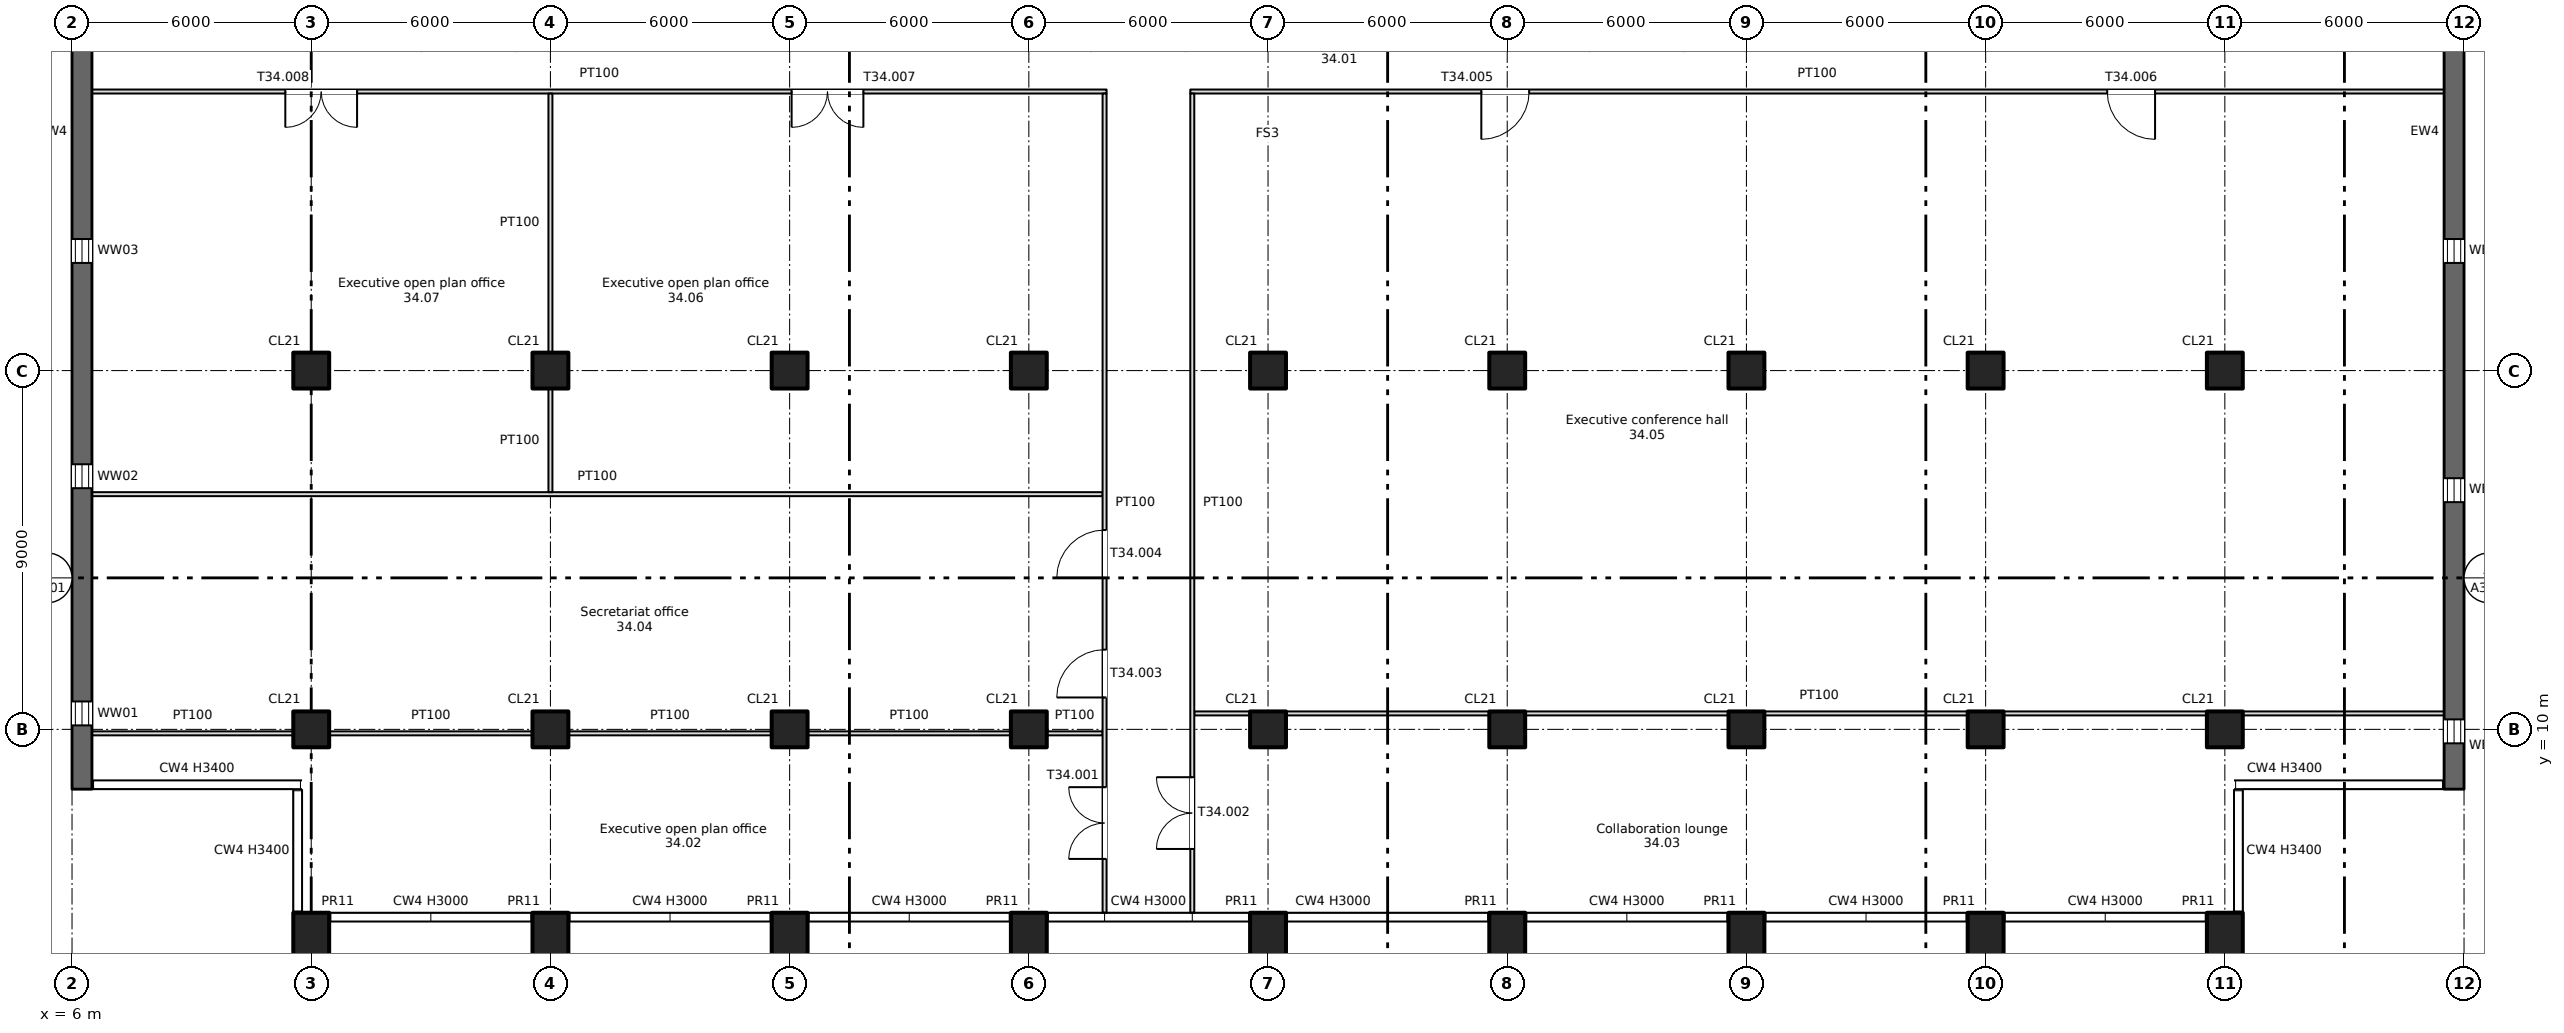
"""IFC4 building model, lengths in metres.
Left out: names, types, materials, properties, quantities, classifications, styles, units other than length and angle.
Written with IfcOpenShell. Run it as: python <this file> out.ifc"""

import sys

from ifc_helpers import new_model, si_unit, direction, frame, frame_2d, origin, origin_2d, place, context, subcontext, project, spatial, rectangle, extrude, element, fill, save


model = new_model("IFC4")
c1 = context("Model", 3, precision=1e-05, world=origin(), true_north=direction((0.0, 1.0)))
c2 = subcontext(c1, "Body", "Model", "MODEL_VIEW")
j1 = project(units=[si_unit("LENGTHUNIT", "METRE"), si_unit("PLANEANGLEUNIT", "RADIAN")], contexts=[c1])
p1 = place(None, origin())
s1 = spatial("IfcSite", under=j1, at=p1, CompositionType="ELEMENT")
p2 = place(p1, origin())
s2 = spatial("IfcBuilding", under=s1, at=p2, CompositionType="ELEMENT")
p3 = place(p2, frame((0.0, 0.0, 239.35)))
s3 = spatial("IfcBuildingStorey", under=s2, at=p3, CompositionType="ELEMENT", Elevation=239.35)
for number, where, z_axis, x_axis in (
    (1, (12.0, 4.7, -0.4), (0.0, 0.0, 1.0), (1.0, 0.0, 0.0)),
    (2, (18.0, 4.7, -0.4), (0.0, 0.0, 1.0), (1.0, 0.0, 0.0)),
    (3, (24.0, 4.7, -0.4), (0.0, 0.0, 1.0), (1.0, 0.0, 0.0)),
    (4, (30.0, 4.7, -0.4), (0.0, 0.0, 1.0), (1.0, 0.0, 0.0)),
    (5, (36.0, 4.7, -0.4), (0.0, 0.0, 1.0), (1.0, 0.0, 0.0)),
    (6, (42.0, 4.7, -0.4), (0.0, 0.0, 1.0), (1.0, 0.0, 0.0)),
    (7, (48.0, 4.7, -0.4), (0.0, 0.0, 1.0), (1.0, 0.0, 0.0)),
    (8, (54.0, 4.7, -0.4), (0.0, 0.0, 1.0), (1.0, 0.0, 0.0)),
    (9, (60.0, 4.7, -0.4), (0.0, 0.0, 1.0), (1.0, 0.0, 0.0)),
):
    element("IfcColumn", number, at=place(p3, frame(where, z_axis=z_axis, x_axis=x_axis)), inside=s3, PredefinedType="COLUMN", context=c2, shape_type="SweptSolid", body=[
        extrude(rectangle(XDim=0.9, YDim=1.4, at=origin_2d()), origin(), (0.0, 0.0, 1.0), 3.8),
    ])
for number, where, z_axis, x_axis in (
    (10, (12.0, 10.0, 0.0), (0.0, 0.0, 1.0), (1.0, 0.0, 0.0)),
    (11, (12.0, 19.0, 0.0), (0.0, 0.0, 1.0), (1.0, 0.0, 0.0)),
    (12, (18.0, 10.0, 0.0), (0.0, 0.0, 1.0), (1.0, 0.0, 0.0)),
    (13, (18.0, 19.0, 0.0), (0.0, 0.0, 1.0), (1.0, 0.0, 0.0)),
    (14, (24.0, 10.0, 0.0), (0.0, 0.0, 1.0), (1.0, 0.0, 0.0)),
    (15, (24.0, 19.0, 0.0), (0.0, 0.0, 1.0), (1.0, 0.0, 0.0)),
    (16, (30.0, 10.0, 0.0), (0.0, 0.0, 1.0), (1.0, 0.0, 0.0)),
    (17, (30.0, 19.0, 0.0), (0.0, 0.0, 1.0), (1.0, 0.0, 0.0)),
    (18, (36.0, 10.0, 0.0), (0.0, 0.0, 1.0), (1.0, 0.0, 0.0)),
    (19, (36.0, 19.0, 0.0), (0.0, 0.0, 1.0), (1.0, 0.0, 0.0)),
    (20, (42.0, 10.0, 0.0), (0.0, 0.0, 1.0), (1.0, 0.0, 0.0)),
    (21, (42.0, 19.0, 0.0), (0.0, 0.0, 1.0), (1.0, 0.0, 0.0)),
    (22, (48.0, 10.0, 0.0), (0.0, 0.0, 1.0), (1.0, 0.0, 0.0)),
    (23, (48.0, 19.0, 0.0), (0.0, 0.0, 1.0), (1.0, 0.0, 0.0)),
    (24, (54.0, 10.0, 0.0), (0.0, 0.0, 1.0), (1.0, 0.0, 0.0)),
    (25, (54.0, 19.0, 0.0), (0.0, 0.0, 1.0), (1.0, 0.0, 0.0)),
    (26, (60.0, 10.0, 0.0), (0.0, 0.0, 1.0), (1.0, 0.0, 0.0)),
    (27, (60.0, 19.0, 0.0), (0.0, 0.0, 1.0), (1.0, 0.0, 0.0)),
):
    element("IfcColumn", number, at=place(p3, frame(where, z_axis=z_axis, x_axis=x_axis)), inside=s3, PredefinedType="COLUMN", context=c2, shape_type="SweptSolid", body=[
        extrude(rectangle(XDim=0.9, YDim=0.9, at=origin_2d()), origin(), (0.0, 0.0, 1.0), 3.4),
    ])
p4 = place(p3, frame((6.25, 8.5, 0.0), z_axis=(0.0, 0.0, 1.0), x_axis=(0.0, 1.0, 0.0)))
e28 = element("IfcWall", 28, at=p4, inside=s3, PredefinedType="SHEAR", context=c2, shape_type="SweptSolid", body=[
    extrude(rectangle(XDim=33.0, YDim=0.5, at=frame_2d((16.5, 0.0))), origin(), (0.0, 0.0, 1.0), 3.4),
])
p5 = place(p4, frame((1.6, 0.0, 0.6)))
e29 = element("IfcOpeningElement", 29, at=p5, cuts=e28, PredefinedType="OPENING", context=c2, shape_type="SweptSolid", body=[
    extrude(rectangle(XDim=0.6, YDim=2.4, at=frame_2d((0.3, 1.2))), frame((0.0, 0.26, 0.0), z_axis=(0.0, -1.0, 0.0), x_axis=(1.0, 0.0, 0.0)), (0.0, 0.0, 1.0), 0.52),
])
p6 = place(p4, frame((7.55, 0.0, 0.6)))
e30 = element("IfcOpeningElement", 30, at=p6, cuts=e28, PredefinedType="OPENING", context=c2, shape_type="SweptSolid", body=[
    extrude(rectangle(XDim=0.6, YDim=2.4, at=frame_2d((0.3, 1.2))), frame((0.0, 0.26, 0.0), z_axis=(0.0, -1.0, 0.0), x_axis=(1.0, 0.0, 0.0)), (0.0, 0.0, 1.0), 0.52),
])
p7 = place(p4, frame((13.2, 0.0, 0.6)))
e31 = element("IfcOpeningElement", 31, at=p7, cuts=e28, PredefinedType="OPENING", context=c2, shape_type="SweptSolid", body=[
    extrude(rectangle(XDim=0.6, YDim=2.4, at=frame_2d((0.3, 1.2))), frame((0.0, 0.26, 0.0), z_axis=(0.0, -1.0, 0.0), x_axis=(1.0, 0.0, 0.0)), (0.0, 0.0, 1.0), 0.52),
])
p8 = place(p3, frame((65.75, 8.5, 0.0), z_axis=(0.0, 0.0, 1.0), x_axis=(0.0, 1.0, 0.0)))
e32 = element("IfcWall", 32, at=p8, inside=s3, PredefinedType="SHEAR", context=c2, shape_type="SweptSolid", body=[
    extrude(rectangle(XDim=33.0, YDim=0.5, at=frame_2d((16.5, 0.0))), origin(), (0.0, 0.0, 1.0), 3.4),
])
p9 = place(p8, frame((1.15, 0.0, 0.6)))
e33 = element("IfcOpeningElement", 33, at=p9, cuts=e32, PredefinedType="OPENING", context=c2, shape_type="SweptSolid", body=[
    extrude(rectangle(XDim=0.6, YDim=2.4, at=frame_2d((0.3, 1.2))), frame((0.0, 0.26, 0.0), z_axis=(0.0, -1.0, 0.0), x_axis=(1.0, 0.0, 0.0)), (0.0, 0.0, 1.0), 0.52),
])
p10 = place(p8, frame((7.2, 0.0, 0.6)))
e34 = element("IfcOpeningElement", 34, at=p10, cuts=e32, PredefinedType="OPENING", context=c2, shape_type="SweptSolid", body=[
    extrude(rectangle(XDim=0.6, YDim=2.4, at=frame_2d((0.3, 1.2))), frame((0.0, 0.26, 0.0), z_axis=(0.0, -1.0, 0.0), x_axis=(1.0, 0.0, 0.0)), (0.0, 0.0, 1.0), 0.52),
])
p11 = place(p8, frame((13.2, 0.0, 0.6)))
e35 = element("IfcOpeningElement", 35, at=p11, cuts=e32, PredefinedType="OPENING", context=c2, shape_type="SweptSolid", body=[
    extrude(rectangle(XDim=0.6, YDim=2.4, at=frame_2d((0.3, 1.2))), frame((0.0, 0.26, 0.0), z_axis=(0.0, -1.0, 0.0), x_axis=(1.0, 0.0, 0.0)), (0.0, 0.0, 1.0), 0.52),
])
p12 = place(p3, frame((30.45, 9.9, 0.0), z_axis=(0.0, 0.0, 1.0), x_axis=(1.0, 0.0, 0.0)))
e36 = element("IfcWall", 36, at=p12, inside=s3, PredefinedType="PARTITIONING", context=c2, shape_type="SweptSolid", body=[
    extrude(rectangle(XDim=1.4, YDim=0.1, at=frame_2d((0.7, 0.0))), origin(), (0.0, 0.0, 1.0), 3.4),
])
for number, where, z_axis, x_axis in (
    (37, (24.45, 9.9, 0.0), (0.0, 0.0, 1.0), (1.0, 0.0, 0.0)),
    (38, (18.45, 9.9, 0.0), (0.0, 0.0, 1.0), (1.0, 0.0, 0.0)),
    (39, (12.45, 9.9, 0.0), (0.0, 0.0, 1.0), (1.0, 0.0, 0.0)),
):
    element("IfcWall", number, at=place(p3, frame(where, z_axis=z_axis, x_axis=x_axis)), inside=s3, PredefinedType="PARTITIONING", context=c2, shape_type="SweptSolid", body=[
        extrude(rectangle(XDim=5.1, YDim=0.1, at=frame_2d((2.55, 0.0))), origin(), (0.0, 0.0, 1.0), 3.4),
    ])
p13 = place(p3, frame((6.5, 9.9, 0.0), z_axis=(0.0, 0.0, 1.0), x_axis=(1.0, 0.0, 0.0)))
e40 = element("IfcWall", 40, at=p13, inside=s3, PredefinedType="PARTITIONING", context=c2, shape_type="SweptSolid", body=[
    extrude(rectangle(XDim=5.05, YDim=0.1, at=frame_2d((2.525, 0.0))), origin(), (0.0, 0.0, 1.0), 3.4),
])
p14 = place(p3, frame((34.15, 10.4, 0.0), z_axis=(0.0, 0.0, 1.0), x_axis=(1.0, 0.0, 0.0)))
e41 = element("IfcWall", 41, at=p14, inside=s3, PredefinedType="PARTITIONING", context=c2, shape_type="SweptSolid", body=[
    extrude(rectangle(XDim=31.35, YDim=0.1, at=frame_2d((15.675, 0.0))), origin(), (0.0, 0.0, 1.0), 3.4),
])
p15 = place(p3, frame((6.5, 15.9, 0.0), z_axis=(0.0, 0.0, 1.0), x_axis=(1.0, 0.0, 0.0)))
e42 = element("IfcWall", 42, at=p15, inside=s3, PredefinedType="PARTITIONING", context=c2, shape_type="SweptSolid", body=[
    extrude(rectangle(XDim=25.35, YDim=0.1, at=frame_2d((12.675, 0.0))), origin(), (0.0, 0.0, 1.0), 3.4),
])
p16 = place(p3, frame((6.5, 26.0, 0.0), z_axis=(0.0, 0.0, 1.0), x_axis=(1.0, 0.0, 0.0)))
e43 = element("IfcWall", 43, at=p16, inside=s3, PredefinedType="PARTITIONING", context=c2, shape_type="SweptSolid", body=[
    extrude(rectangle(XDim=25.45, YDim=0.1, at=frame_2d((12.725, 0.0))), origin(), (0.0, 0.0, 1.0), 3.4),
])
p17 = place(p16, frame((17.55, 0.0, 0.0)))
e44 = element("IfcOpeningElement", 44, at=p17, cuts=e43, PredefinedType="OPENING", context=c2, shape_type="SweptSolid", body=[
    extrude(rectangle(XDim=1.8, YDim=2.1, at=frame_2d((0.9, 1.05))), frame((0.0, 0.06, 0.0), z_axis=(0.0, -1.0, 0.0), x_axis=(1.0, 0.0, 0.0)), (0.0, 0.0, 1.0), 0.12),
])
p18 = place(p16, frame((4.85, 0.0, 0.0)))
e45 = element("IfcOpeningElement", 45, at=p18, cuts=e43, PredefinedType="OPENING", context=c2, shape_type="SweptSolid", body=[
    extrude(rectangle(XDim=1.8, YDim=2.1, at=frame_2d((0.9, 1.05))), frame((0.0, 0.06, 0.0), z_axis=(0.0, -1.0, 0.0), x_axis=(1.0, 0.0, 0.0)), (0.0, 0.0, 1.0), 0.12),
])
p19 = place(p3, frame((34.05, 26.0, 0.0), z_axis=(0.0, 0.0, 1.0), x_axis=(1.0, 0.0, 0.0)))
e46 = element("IfcWall", 46, at=p19, inside=s3, PredefinedType="PARTITIONING", context=c2, shape_type="SweptSolid", body=[
    extrude(rectangle(XDim=31.45, YDim=0.1, at=frame_2d((15.725, 0.0))), origin(), (0.0, 0.0, 1.0), 3.4),
])
p20 = place(p19, frame((7.3, 0.0, 0.0)))
e47 = element("IfcOpeningElement", 47, at=p20, cuts=e46, PredefinedType="OPENING", context=c2, shape_type="SweptSolid", body=[
    extrude(rectangle(XDim=1.2, YDim=2.1, at=frame_2d((0.6, 1.05))), frame((0.0, 0.06, 0.0), z_axis=(0.0, -1.0, 0.0), x_axis=(1.0, 0.0, 0.0)), (0.0, 0.0, 1.0), 0.12),
])
p21 = place(p19, frame((23.0, 0.0, 0.0)))
e48 = element("IfcOpeningElement", 48, at=p21, cuts=e46, PredefinedType="OPENING", context=c2, shape_type="SweptSolid", body=[
    extrude(rectangle(XDim=1.2, YDim=2.1, at=frame_2d((0.6, 1.05))), frame((0.0, 0.06, 0.0), z_axis=(0.0, -1.0, 0.0), x_axis=(1.0, 0.0, 0.0)), (0.0, 0.0, 1.0), 0.12),
])
p22 = place(p3, frame((18.0, 15.95, 0.0), z_axis=(0.0, 0.0, 1.0), x_axis=(0.0, 1.0, 0.0)))
e49 = element("IfcWall", 49, at=p22, inside=s3, PredefinedType="PARTITIONING", context=c2, shape_type="SweptSolid", body=[
    extrude(rectangle(XDim=2.6, YDim=0.1, at=frame_2d((1.3, 0.0))), origin(), (0.0, 0.0, 1.0), 3.4),
])
p23 = place(p3, frame((18.0, 19.45, 0.0), z_axis=(0.0, 0.0, 1.0), x_axis=(0.0, 1.0, 0.0)))
e50 = element("IfcWall", 50, at=p23, inside=s3, PredefinedType="PARTITIONING", context=c2, shape_type="SweptSolid", body=[
    extrude(rectangle(XDim=6.5, YDim=0.1, at=frame_2d((3.25, 0.0))), origin(), (0.0, 0.0, 1.0), 3.4),
])
p24 = place(p3, frame((31.9, 5.4, 0.0), z_axis=(0.0, 0.0, 1.0), x_axis=(0.0, 1.0, 0.0)))
e51 = element("IfcWall", 51, at=p24, inside=s3, PredefinedType="PARTITIONING", context=c2, shape_type="SweptSolid", body=[
    extrude(rectangle(XDim=20.55, YDim=0.1, at=frame_2d((10.275, 0.0))), origin(), (0.0, 0.0, 1.0), 3.4),
])
p25 = place(p24, frame((1.35, 0.0, 0.0)))
e52 = element("IfcOpeningElement", 52, at=p25, cuts=e51, PredefinedType="OPENING", context=c2, shape_type="SweptSolid", body=[
    extrude(rectangle(XDim=1.8, YDim=2.1, at=frame_2d((0.9, 1.05))), frame((0.0, 0.06, 0.0), z_axis=(0.0, -1.0, 0.0), x_axis=(1.0, 0.0, 0.0)), (0.0, 0.0, 1.0), 0.12),
])
p26 = place(p24, frame((5.4, 0.0, 0.0)))
e53 = element("IfcOpeningElement", 53, at=p26, cuts=e51, PredefinedType="OPENING", context=c2, shape_type="SweptSolid", body=[
    extrude(rectangle(XDim=1.2, YDim=2.1, at=frame_2d((0.6, 1.05))), frame((0.0, 0.06, 0.0), z_axis=(0.0, -1.0, 0.0), x_axis=(1.0, 0.0, 0.0)), (0.0, 0.0, 1.0), 0.12),
])
p27 = place(p24, frame((8.4, 0.0, 0.0)))
e54 = element("IfcOpeningElement", 54, at=p27, cuts=e51, PredefinedType="OPENING", context=c2, shape_type="SweptSolid", body=[
    extrude(rectangle(XDim=1.2, YDim=2.1, at=frame_2d((0.6, 1.05))), frame((0.0, 0.06, 0.0), z_axis=(0.0, -1.0, 0.0), x_axis=(1.0, 0.0, 0.0)), (0.0, 0.0, 1.0), 0.12),
])
p28 = place(p3, frame((34.1, 5.4, 0.0), z_axis=(0.0, 0.0, 1.0), x_axis=(0.0, 1.0, 0.0)))
e55 = element("IfcWall", 55, at=p28, inside=s3, PredefinedType="PARTITIONING", context=c2, shape_type="SweptSolid", body=[
    extrude(rectangle(XDim=20.55, YDim=0.1, at=frame_2d((10.275, 0.0))), origin(), (0.0, 0.0, 1.0), 3.4),
])
p29 = place(p28, frame((1.6, 0.0, 0.0)))
e56 = element("IfcOpeningElement", 56, at=p29, cuts=e55, PredefinedType="OPENING", context=c2, shape_type="SweptSolid", body=[
    extrude(rectangle(XDim=1.8, YDim=2.1, at=frame_2d((0.9, 1.05))), frame((0.0, 0.06, 0.0), z_axis=(0.0, -1.0, 0.0), x_axis=(1.0, 0.0, 0.0)), (0.0, 0.0, 1.0), 0.12),
])
p30 = place(p5, origin())
e57 = element("IfcWindow", 57, at=p30, inside=s3, PartitioningType="SINGLE_PANEL", PredefinedType="WINDOW", context=c2, shape_type="SweptSolid", body=[
    extrude(rectangle(XDim=0.6, YDim=2.4, at=frame_2d((0.3, 1.2))), frame((0.0, 0.03, 0.0), z_axis=(0.0, -1.0, 0.0), x_axis=(1.0, 0.0, 0.0)), (0.0, 0.0, 1.0), 0.06),
])
fill(e29, e57)
p31 = place(p6, origin())
e58 = element("IfcWindow", 58, at=p31, inside=s3, PartitioningType="SINGLE_PANEL", PredefinedType="WINDOW", context=c2, shape_type="SweptSolid", body=[
    extrude(rectangle(XDim=0.6, YDim=2.4, at=frame_2d((0.3, 1.2))), frame((0.0, 0.03, 0.0), z_axis=(0.0, -1.0, 0.0), x_axis=(1.0, 0.0, 0.0)), (0.0, 0.0, 1.0), 0.06),
])
fill(e30, e58)
p32 = place(p7, origin())
e59 = element("IfcWindow", 59, at=p32, inside=s3, PartitioningType="SINGLE_PANEL", PredefinedType="WINDOW", context=c2, shape_type="SweptSolid", body=[
    extrude(rectangle(XDim=0.6, YDim=2.4, at=frame_2d((0.3, 1.2))), frame((0.0, 0.03, 0.0), z_axis=(0.0, -1.0, 0.0), x_axis=(1.0, 0.0, 0.0)), (0.0, 0.0, 1.0), 0.06),
])
fill(e31, e59)
p33 = place(p9, origin())
e60 = element("IfcWindow", 60, at=p33, inside=s3, PartitioningType="SINGLE_PANEL", PredefinedType="WINDOW", context=c2, shape_type="SweptSolid", body=[
    extrude(rectangle(XDim=0.6, YDim=2.4, at=frame_2d((0.3, 1.2))), frame((0.0, 0.03, 0.0), z_axis=(0.0, -1.0, 0.0), x_axis=(1.0, 0.0, 0.0)), (0.0, 0.0, 1.0), 0.06),
])
fill(e33, e60)
p34 = place(p10, origin())
e61 = element("IfcWindow", 61, at=p34, inside=s3, PartitioningType="SINGLE_PANEL", PredefinedType="WINDOW", context=c2, shape_type="SweptSolid", body=[
    extrude(rectangle(XDim=0.6, YDim=2.4, at=frame_2d((0.3, 1.2))), frame((0.0, 0.03, 0.0), z_axis=(0.0, -1.0, 0.0), x_axis=(1.0, 0.0, 0.0)), (0.0, 0.0, 1.0), 0.06),
])
fill(e34, e61)
p35 = place(p11, origin())
e62 = element("IfcWindow", 62, at=p35, inside=s3, PartitioningType="SINGLE_PANEL", PredefinedType="WINDOW", context=c2, shape_type="SweptSolid", body=[
    extrude(rectangle(XDim=0.6, YDim=2.4, at=frame_2d((0.3, 1.2))), frame((0.0, 0.03, 0.0), z_axis=(0.0, -1.0, 0.0), x_axis=(1.0, 0.0, 0.0)), (0.0, 0.0, 1.0), 0.06),
])
fill(e35, e62)
p36 = place(p25, origin())
e63 = element("IfcDoor", 63, at=p36, inside=s3, OperationType="DOUBLE_DOOR_SINGLE_SWING", PredefinedType="DOOR", context=c2, shape_type="SweptSolid", body=[
    extrude(rectangle(XDim=1.8, YDim=2.1, at=frame_2d((0.9, 1.05))), frame((0.0, 0.025, 0.0), z_axis=(0.0, -1.0, 0.0), x_axis=(1.0, 0.0, 0.0)), (0.0, 0.0, 1.0), 0.05),
])
fill(e52, e63)
p37 = place(p29, origin())
e64 = element("IfcDoor", 64, at=p37, inside=s3, OperationType="DOUBLE_DOOR_SINGLE_SWING", PredefinedType="DOOR", context=c2, shape_type="SweptSolid", body=[
    extrude(rectangle(XDim=1.8, YDim=2.1, at=frame_2d((0.9, 1.05))), frame((0.0, 0.025, 0.0), z_axis=(0.0, -1.0, 0.0), x_axis=(1.0, 0.0, 0.0)), (0.0, 0.0, 1.0), 0.05),
])
fill(e56, e64)
p38 = place(p26, origin())
e65 = element("IfcDoor", 65, at=p38, inside=s3, OperationType="SINGLE_SWING_LEFT", PredefinedType="DOOR", context=c2, shape_type="SweptSolid", body=[
    extrude(rectangle(XDim=1.2, YDim=2.1, at=frame_2d((0.6, 1.05))), frame((0.0, 0.025, 0.0), z_axis=(0.0, -1.0, 0.0), x_axis=(1.0, 0.0, 0.0)), (0.0, 0.0, 1.0), 0.05),
])
fill(e53, e65)
p39 = place(p27, origin())
e66 = element("IfcDoor", 66, at=p39, inside=s3, OperationType="SINGLE_SWING_LEFT", PredefinedType="DOOR", context=c2, shape_type="SweptSolid", body=[
    extrude(rectangle(XDim=1.2, YDim=2.1, at=frame_2d((0.6, 1.05))), frame((0.0, 0.025, 0.0), z_axis=(0.0, -1.0, 0.0), x_axis=(1.0, 0.0, 0.0)), (0.0, 0.0, 1.0), 0.05),
])
fill(e54, e66)
p40 = place(p20, origin())
e67 = element("IfcDoor", 67, at=p40, inside=s3, OperationType="SINGLE_SWING_LEFT", PredefinedType="DOOR", context=c2, shape_type="SweptSolid", body=[
    extrude(rectangle(XDim=1.2, YDim=2.1, at=frame_2d((0.6, 1.05))), frame((0.0, 0.025, 0.0), z_axis=(0.0, -1.0, 0.0), x_axis=(1.0, 0.0, 0.0)), (0.0, 0.0, 1.0), 0.05),
])
fill(e47, e67)
p41 = place(p21, origin())
e68 = element("IfcDoor", 68, at=p41, inside=s3, OperationType="SINGLE_SWING_RIGHT", PredefinedType="DOOR", context=c2, shape_type="SweptSolid", body=[
    extrude(rectangle(XDim=1.2, YDim=2.1, at=frame_2d((0.6, 1.05))), frame((0.0, 0.025, 0.0), z_axis=(0.0, -1.0, 0.0), x_axis=(1.0, 0.0, 0.0)), (0.0, 0.0, 1.0), 0.05),
])
fill(e48, e68)
p42 = place(p17, origin())
e69 = element("IfcDoor", 69, at=p42, inside=s3, OperationType="DOUBLE_DOOR_SINGLE_SWING", PredefinedType="DOOR", context=c2, shape_type="SweptSolid", body=[
    extrude(rectangle(XDim=1.8, YDim=2.1, at=frame_2d((0.9, 1.05))), frame((0.0, 0.025, 0.0), z_axis=(0.0, -1.0, 0.0), x_axis=(1.0, 0.0, 0.0)), (0.0, 0.0, 1.0), 0.05),
])
fill(e44, e69)
p43 = place(p18, origin())
e70 = element("IfcDoor", 70, at=p43, inside=s3, OperationType="DOUBLE_DOOR_SINGLE_SWING", PredefinedType="DOOR", context=c2, shape_type="SweptSolid", body=[
    extrude(rectangle(XDim=1.8, YDim=2.1, at=frame_2d((0.9, 1.05))), frame((0.0, 0.025, 0.0), z_axis=(0.0, -1.0, 0.0), x_axis=(1.0, 0.0, 0.0)), (0.0, 0.0, 1.0), 0.05),
])
fill(e45, e70)
save(model, sys.argv[1])
